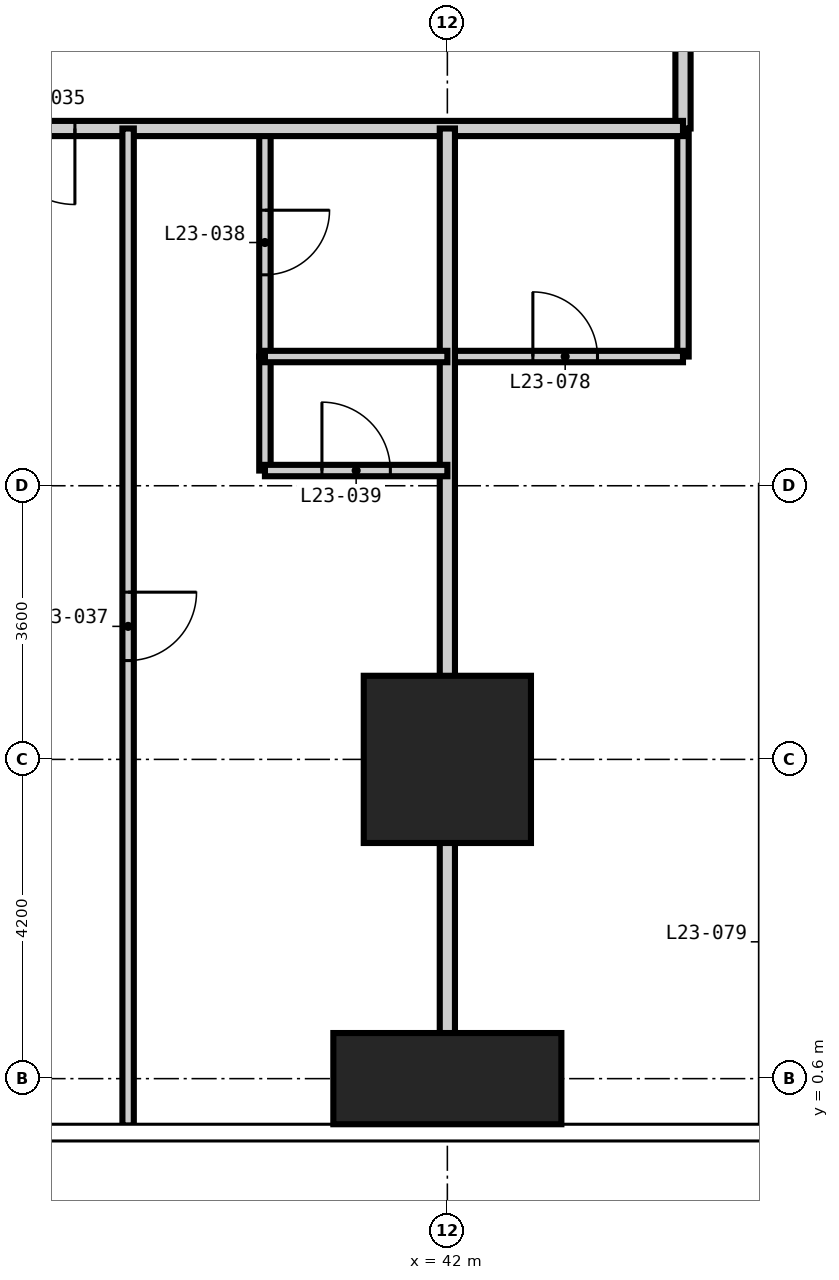
"""IFC4 building model, lengths in metres.
Left out: names, types, materials, properties, quantities, classifications, styles, units other than length and angle.
Written with IfcOpenShell. Run it as: python <this file> out.ifc"""

import sys

from ifc_helpers import new_model, si_unit, direction, frame, frame_2d, origin, origin_2d, place, context, subcontext, project, spatial, rectangle, extrude, element, fill, save


model = new_model("IFC4")
c1 = context("Model", 3, precision=1e-05, world=origin(), true_north=direction((0.0, 1.0)))
c2 = subcontext(c1, "Body", "Model", "MODEL_VIEW")
j1 = project(units=[si_unit("LENGTHUNIT", "METRE"), si_unit("PLANEANGLEUNIT", "RADIAN")], contexts=[c1])
p1 = place(None, origin())
s1 = spatial("IfcSite", under=j1, at=p1, CompositionType="ELEMENT")
p2 = place(p1, origin())
s2 = spatial("IfcBuilding", under=s1, at=p2, CompositionType="ELEMENT")
p3 = place(p2, frame((0.0, 0.0, 93.6)))
s3 = spatial("IfcBuildingStorey", under=s2, at=p3, CompositionType="ELEMENT", Elevation=93.6)
p4 = place(p3, frame((42.0, 0.6, -0.35), z_axis=(0.0, 0.0, 1.0), x_axis=(1.0, 0.0, 0.0)))
e1 = element("IfcColumn", 1, at=p4, inside=s3, PredefinedType="COLUMN", context=c2, shape_type="SweptSolid", body=[
    extrude(rectangle(XDim=3.0, YDim=1.2, at=origin_2d()), origin(), (0.0, 0.0, 1.0), 3.6),
])
p5 = place(p3, frame((42.0, 4.8, -0.35), z_axis=(0.0, 0.0, 1.0), x_axis=(1.0, 0.0, 0.0)))
e2 = element("IfcColumn", 2, at=p5, inside=s3, PredefinedType="COLUMN", context=c2, shape_type="SweptSolid", body=[
    extrude(rectangle(XDim=2.2, YDim=2.2, at=origin_2d()), origin(), (0.0, 0.0, 1.0), 3.6),
])
p6 = place(p3, frame((39.6, 10.1, 0.0), z_axis=(0.0, 0.0, 1.0), x_axis=(0.0, 1.0, 0.0)))
e3 = element("IfcWall", 3, at=p6, inside=s3, PredefinedType="PARTITIONING", context=c2, shape_type="SweptSolid", body=[
    extrude(rectangle(XDim=3.0, YDim=0.15, at=frame_2d((1.5, 0.0))), origin(), (0.0, 0.0, 1.0), 3.25),
])
p7 = place(p6, frame((1.075, 0.0, 0.0)))
e4 = element("IfcOpeningElement", 4, at=p7, cuts=e3, PredefinedType="OPENING", context=c2, shape_type="SweptSolid", body=[
    extrude(rectangle(XDim=0.85, YDim=2.1, at=frame_2d((0.425, 1.05))), frame((0.0, 0.085, 0.0), z_axis=(0.0, -1.0, 0.0), x_axis=(1.0, 0.0, 0.0)), (0.0, 0.0, 1.0), 0.17),
])
p8 = place(p3, frame((45.1, 10.1, 0.0), z_axis=(0.0, 0.0, 1.0), x_axis=(0.0, 1.0, 0.0)))
e5 = element("IfcWall", 5, at=p8, inside=s3, PredefinedType="PARTITIONING", context=c2, shape_type="SweptSolid", body=[
    extrude(rectangle(XDim=3.0, YDim=0.15, at=frame_2d((1.5, 0.0))), origin(), (0.0, 0.0, 1.0), 3.25),
])
p9 = place(p3, frame((42.0, 10.1, 0.0), z_axis=(0.0, 0.0, 1.0), x_axis=(1.0, 0.0, 0.0)))
e6 = element("IfcWall", 6, at=p9, inside=s3, PredefinedType="PARTITIONING", context=c2, shape_type="SweptSolid", body=[
    extrude(rectangle(XDim=3.1, YDim=0.15, at=frame_2d((1.55, 0.0))), origin(), (0.0, 0.0, 1.0), 3.25),
])
p10 = place(p9, frame((1.125, 0.0, 0.0)))
e7 = element("IfcOpeningElement", 7, at=p10, cuts=e6, PredefinedType="OPENING", context=c2, shape_type="SweptSolid", body=[
    extrude(rectangle(XDim=0.85, YDim=2.1, at=frame_2d((0.425, 1.05))), frame((0.0, 0.085, 0.0), z_axis=(0.0, -1.0, 0.0), x_axis=(1.0, 0.0, 0.0)), (0.0, 0.0, 1.0), 0.17),
])
p11 = place(p3, frame((45.1, 44.5, 0.0), z_axis=(0.0, 0.0, 1.0), x_axis=(0.0, -1.0, 0.0)))
e8 = element("IfcWall", 8, at=p11, inside=s3, PredefinedType="PARTITIONING", context=c2, shape_type="SweptSolid", body=[
    extrude(rectangle(XDim=31.4, YDim=0.2, at=frame_2d((15.7, 0.0))), origin(), (0.0, 0.0, 1.0), 3.25),
])
p12 = place(p11, frame((21.65, 0.0, 0.0)))
e9 = element("IfcOpeningElement", 9, at=p12, cuts=e8, PredefinedType="OPENING", context=c2, shape_type="SweptSolid", body=[
    extrude(rectangle(XDim=1.0, YDim=2.2, at=frame_2d((0.5, 1.1))), frame((0.0, 0.11, 0.0), z_axis=(0.0, -1.0, 0.0), x_axis=(1.0, 0.0, 0.0)), (0.0, 0.0, 1.0), 0.22),
])
p13 = place(p11, frame((15.95, 0.0, 0.0)))
e10 = element("IfcOpeningElement", 10, at=p13, cuts=e8, PredefinedType="OPENING", context=c2, shape_type="SweptSolid", body=[
    extrude(rectangle(XDim=1.0, YDim=2.2, at=frame_2d((0.5, 1.1))), frame((0.0, 0.11, 0.0), z_axis=(0.0, -1.0, 0.0), x_axis=(1.0, 0.0, 0.0)), (0.0, 0.0, 1.0), 0.22),
])
p14 = place(p11, frame((4.85, 0.0, 0.0)))
e11 = element("IfcOpeningElement", 11, at=p14, cuts=e8, PredefinedType="OPENING", context=c2, shape_type="SweptSolid", body=[
    extrude(rectangle(XDim=1.0, YDim=2.2, at=frame_2d((0.5, 1.1))), frame((0.0, 0.11, 0.0), z_axis=(0.0, -1.0, 0.0), x_axis=(1.0, 0.0, 0.0)), (0.0, 0.0, 1.0), 0.22),
])
p15 = place(p11, frame((29.05, 0.0, 0.0)))
e12 = element("IfcOpeningElement", 12, at=p15, cuts=e8, PredefinedType="OPENING", context=c2, shape_type="SweptSolid", body=[
    extrude(rectangle(XDim=1.0, YDim=2.2, at=frame_2d((0.5, 1.1))), frame((0.0, 0.11, 0.0), z_axis=(0.0, -1.0, 0.0), x_axis=(1.0, 0.0, 0.0)), (0.0, 0.0, 1.0), 0.22),
])
p16 = place(p11, frame((0.75, 0.0, 0.0)))
e13 = element("IfcOpeningElement", 13, at=p16, cuts=e8, PredefinedType="OPENING", context=c2, shape_type="SweptSolid", body=[
    extrude(rectangle(XDim=1.0, YDim=2.2, at=frame_2d((0.5, 1.1))), frame((0.0, 0.11, 0.0), z_axis=(0.0, -1.0, 0.0), x_axis=(1.0, 0.0, 0.0)), (0.0, 0.0, 1.0), 0.22),
])
p17 = place(p3, frame((45.1, 13.1, 0.0), z_axis=(0.0, 0.0, 1.0), x_axis=(-1.0, 0.0, 0.0)))
e14 = element("IfcWall", 14, at=p17, inside=s3, PredefinedType="PARTITIONING", context=c2, shape_type="SweptSolid", body=[
    extrude(rectangle(XDim=32.5, YDim=0.2, at=frame_2d((16.25, 0.0))), origin(), (0.0, 0.0, 1.0), 3.25),
])
p18 = place(p17, frame((24.8, 0.0, 0.0)))
e15 = element("IfcOpeningElement", 15, at=p18, cuts=e14, PredefinedType="OPENING", context=c2, shape_type="SweptSolid", body=[
    extrude(rectangle(XDim=1.0, YDim=2.2, at=frame_2d((0.5, 1.1))), frame((0.0, 0.11, 0.0), z_axis=(0.0, -1.0, 0.0), x_axis=(1.0, 0.0, 0.0)), (0.0, 0.0, 1.0), 0.22),
])
p19 = place(p17, frame((14.0, 0.0, 0.0)))
e16 = element("IfcOpeningElement", 16, at=p19, cuts=e14, PredefinedType="OPENING", context=c2, shape_type="SweptSolid", body=[
    extrude(rectangle(XDim=1.0, YDim=2.2, at=frame_2d((0.5, 1.1))), frame((0.0, 0.11, 0.0), z_axis=(0.0, -1.0, 0.0), x_axis=(1.0, 0.0, 0.0)), (0.0, 0.0, 1.0), 0.22),
])
p20 = place(p17, frame((8.0, 0.0, 0.0)))
e17 = element("IfcOpeningElement", 17, at=p20, cuts=e14, PredefinedType="OPENING", context=c2, shape_type="SweptSolid", body=[
    extrude(rectangle(XDim=1.0, YDim=2.2, at=frame_2d((0.5, 1.1))), frame((0.0, 0.11, 0.0), z_axis=(0.0, -1.0, 0.0), x_axis=(1.0, 0.0, 0.0)), (0.0, 0.0, 1.0), 0.22),
])
p21 = place(p3, frame((42.0, -0.018, 0.0), z_axis=(0.0, 0.0, 1.0), x_axis=(0.0, 1.0, 0.0)))
e18 = element("IfcWall", 18, at=p21, inside=s3, PredefinedType="PARTITIONING", context=c2, shape_type="SweptSolid", body=[
    extrude(rectangle(XDim=13.118, YDim=0.2, at=frame_2d((6.559, 0.0))), origin(), (0.0, 0.0, 1.0), 3.25),
])
p22 = place(p3, frame((37.8, -0.018, 0.0), z_axis=(0.0, 0.0, 1.0), x_axis=(0.0, 1.0, 0.0)))
e19 = element("IfcWall", 19, at=p22, inside=s3, PredefinedType="PARTITIONING", context=c2, shape_type="SweptSolid", body=[
    extrude(rectangle(XDim=13.118, YDim=0.15, at=frame_2d((6.559, 0.0))), origin(), (0.0, 0.0, 1.0), 3.25),
])
p23 = place(p22, frame((6.118, 0.0, 0.0)))
e20 = element("IfcOpeningElement", 20, at=p23, cuts=e19, PredefinedType="OPENING", context=c2, shape_type="SweptSolid", body=[
    extrude(rectangle(XDim=0.9, YDim=2.1, at=frame_2d((0.45, 1.05))), frame((0.0, 0.085, 0.0), z_axis=(0.0, -1.0, 0.0), x_axis=(1.0, 0.0, 0.0)), (0.0, 0.0, 1.0), 0.17),
])
p24 = place(p3, frame((39.6, 8.6, 0.0), z_axis=(0.0, 0.0, 1.0), x_axis=(0.0, 1.0, 0.0)))
e21 = element("IfcWall", 21, at=p24, inside=s3, PredefinedType="PARTITIONING", context=c2, shape_type="SweptSolid", body=[
    extrude(rectangle(XDim=1.5, YDim=0.15, at=frame_2d((0.75, 0.0))), origin(), (0.0, 0.0, 1.0), 3.25),
])
p25 = place(p3, frame((39.6, 8.6, 0.0), z_axis=(0.0, 0.0, 1.0), x_axis=(1.0, 0.0, 0.0)))
e22 = element("IfcWall", 22, at=p25, inside=s3, PredefinedType="PARTITIONING", context=c2, shape_type="SweptSolid", body=[
    extrude(rectangle(XDim=2.4, YDim=0.15, at=frame_2d((1.2, 0.0))), origin(), (0.0, 0.0, 1.0), 3.25),
])
p26 = place(p25, frame((0.75, 0.0, 0.0)))
e23 = element("IfcOpeningElement", 23, at=p26, cuts=e22, PredefinedType="OPENING", context=c2, shape_type="SweptSolid", body=[
    extrude(rectangle(XDim=0.9, YDim=2.1, at=frame_2d((0.45, 1.05))), frame((0.0, 0.085, 0.0), z_axis=(0.0, -1.0, 0.0), x_axis=(1.0, 0.0, 0.0)), (0.0, 0.0, 1.0), 0.17),
])
p27 = place(p3, frame((39.6, 10.1, 0.0), z_axis=(0.0, 0.0, 1.0), x_axis=(1.0, 0.0, 0.0)))
e24 = element("IfcWall", 24, at=p27, inside=s3, PredefinedType="PARTITIONING", context=c2, shape_type="SweptSolid", body=[
    extrude(rectangle(XDim=2.4, YDim=0.15, at=frame_2d((1.2, 0.0))), origin(), (0.0, 0.0, 1.0), 3.25),
])
p28 = place(p20, origin())
e25 = element("IfcDoor", 25, at=p28, inside=s3, OperationType="SINGLE_SWING_LEFT", PredefinedType="DOOR", context=c2, shape_type="SweptSolid", body=[
    extrude(rectangle(XDim=1.0, YDim=2.2, at=frame_2d((0.5, 1.1))), frame((0.0, 0.025, 0.0), z_axis=(0.0, -1.0, 0.0), x_axis=(1.0, 0.0, 0.0)), (0.0, 0.0, 1.0), 0.05),
])
fill(e17, e25)
p29 = place(p23, frame((0.9, 0.0, 0.0), z_axis=(0.0, 0.0, 1.0), x_axis=(-1.0, 0.0, 0.0)))
e26 = element("IfcDoor", 26, at=p29, inside=s3, OperationType="SINGLE_SWING_LEFT", PredefinedType="DOOR", context=c2, shape_type="SweptSolid", body=[
    extrude(rectangle(XDim=0.9, YDim=2.1, at=frame_2d((0.45, 1.05))), frame((0.0, 0.025, 0.0), z_axis=(0.0, -1.0, 0.0), x_axis=(1.0, 0.0, 0.0)), (0.0, 0.0, 1.0), 0.05),
])
fill(e20, e26)
p30 = place(p7, frame((0.85, 0.0, 0.0), z_axis=(0.0, 0.0, 1.0), x_axis=(-1.0, 0.0, 0.0)))
e27 = element("IfcDoor", 27, at=p30, inside=s3, OperationType="SINGLE_SWING_LEFT", PredefinedType="DOOR", context=c2, shape_type="SweptSolid", body=[
    extrude(rectangle(XDim=0.85, YDim=2.1, at=frame_2d((0.425, 1.05))), frame((0.0, 0.025, 0.0), z_axis=(0.0, -1.0, 0.0), x_axis=(1.0, 0.0, 0.0)), (0.0, 0.0, 1.0), 0.05),
])
fill(e4, e27)
p31 = place(p26, origin())
e28 = element("IfcDoor", 28, at=p31, inside=s3, OperationType="SINGLE_SWING_LEFT", PredefinedType="DOOR", context=c2, shape_type="SweptSolid", body=[
    extrude(rectangle(XDim=0.9, YDim=2.1, at=frame_2d((0.45, 1.05))), frame((0.0, 0.025, 0.0), z_axis=(0.0, -1.0, 0.0), x_axis=(1.0, 0.0, 0.0)), (0.0, 0.0, 1.0), 0.05),
])
fill(e23, e28)
p32 = place(p10, origin())
e29 = element("IfcDoor", 29, at=p32, inside=s3, OperationType="SINGLE_SWING_LEFT", PredefinedType="DOOR", context=c2, shape_type="SweptSolid", body=[
    extrude(rectangle(XDim=0.85, YDim=2.1, at=frame_2d((0.425, 1.05))), frame((0.0, 0.025, 0.0), z_axis=(0.0, -1.0, 0.0), x_axis=(1.0, 0.0, 0.0)), (0.0, 0.0, 1.0), 0.05),
])
fill(e7, e29)
save(model, sys.argv[1])
